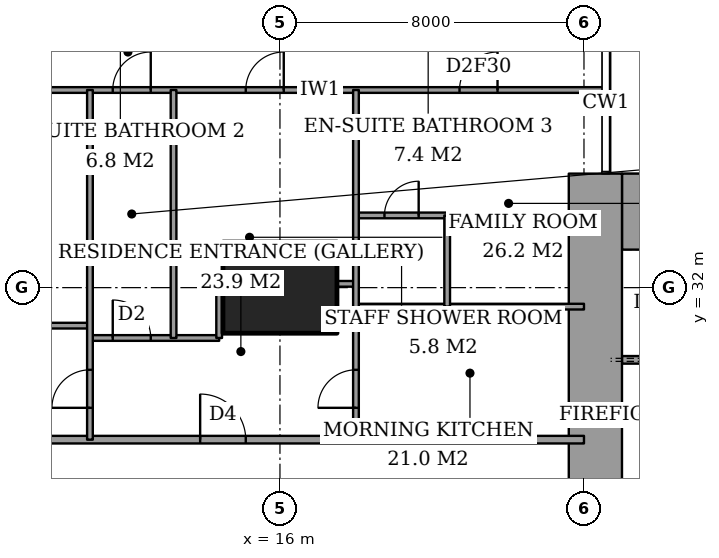
"""IFC4 building model, lengths in metres.
Left out: names, types, materials, properties, quantities, classifications, styles, units other than length and angle.
Written with IfcOpenShell. Run it as: python <this file> out.ifc"""

import sys

from ifc_helpers import new_model, si_unit, direction, frame, frame_2d, origin, origin_2d, place, context, subcontext, project, spatial, rectangle, extrude, element, fill, save


model = new_model("IFC4")
c1 = context("Model", 3, precision=1e-05, world=origin(), true_north=direction((0.0, 1.0)))
c2 = subcontext(c1, "Body", "Model", "MODEL_VIEW")
j1 = project(units=[si_unit("LENGTHUNIT", "METRE"), si_unit("PLANEANGLEUNIT", "RADIAN")], contexts=[c1])
p1 = place(None, origin())
s1 = spatial("IfcSite", under=j1, at=p1, CompositionType="ELEMENT")
p2 = place(p1, origin())
s2 = spatial("IfcBuilding", under=s1, at=p2, CompositionType="ELEMENT")
p3 = place(p2, frame((0.0, 0.0, 114.2)))
s3 = spatial("IfcBuildingStorey", under=s2, at=p3, CompositionType="ELEMENT", Elevation=114.2)
p4 = place(p3, frame((16.0, 32.0, 0.0), z_axis=(0.0, 0.0, 1.0), x_axis=(1.0, 0.0, 0.0)))
e1 = element("IfcColumn", 1, at=p4, inside=s3, PredefinedType="COLUMN", context=c2, shape_type="SweptSolid", body=[
    extrude(rectangle(XDim=3.0, YDim=2.4, at=origin_2d()), origin(), (0.0, 0.0, 1.0), 3.6),
])
p5 = place(p3, frame((25.0, 34.0, 0.0), z_axis=(0.0, 0.0, 1.0), x_axis=(1.0, 0.0, 0.0)))
e2 = element("IfcWall", 2, at=p5, inside=s3, PredefinedType="SHEAR", context=c2, shape_type="SweptSolid", body=[
    extrude(rectangle(XDim=3.15, YDim=2.0, at=frame_2d((1.575, 0.0))), origin(), (0.0, 0.0, 1.0), 3.6),
])
p6 = place(p3, frame((24.3, 23.15, 0.0), z_axis=(0.0, 0.0, 1.0), x_axis=(0.0, 1.0, 0.0)))
e3 = element("IfcWall", 3, at=p6, inside=s3, PredefinedType="SHEAR", context=c2, shape_type="SweptSolid", body=[
    extrude(rectangle(XDim=11.85, YDim=1.4, at=frame_2d((5.925, 0.0))), origin(), (0.0, 0.0, 1.0), 3.6),
])
p7 = place(p6, frame((0.75, 0.0, 0.0)))
e4 = element("IfcOpeningElement", 4, at=p7, cuts=e3, PredefinedType="OPENING", context=c2, shape_type="SweptSolid", body=[
    extrude(rectangle(XDim=1.8, YDim=2.4, at=frame_2d((0.9, 1.2))), frame((0.0, 0.71, 0.0), z_axis=(0.0, -1.0, 0.0), x_axis=(1.0, 0.0, 0.0)), (0.0, 0.0, 1.0), 1.42),
])
p8 = place(p3, frame((6.725, 28.0, 0.0), z_axis=(0.0, 0.0, 1.0), x_axis=(1.0, 0.0, 0.0)))
e5 = element("IfcWall", 5, at=p8, inside=s3, PredefinedType="PARTITIONING", context=c2, shape_type="SweptSolid", body=[
    extrude(rectangle(XDim=17.275, YDim=0.2, at=frame_2d((8.637, 0.0))), origin(), (0.0, 0.0, 1.0), 3.35),
])
p9 = place(p8, frame((7.175, 0.0, 0.0)))
e6 = element("IfcOpeningElement", 6, at=p9, cuts=e5, PredefinedType="OPENING", context=c2, shape_type="SweptSolid", body=[
    extrude(rectangle(XDim=1.2, YDim=2.4, at=frame_2d((0.6, 1.2))), frame((0.0, 0.11, 0.0), z_axis=(0.0, -1.0, 0.0), x_axis=(1.0, 0.0, 0.0)), (0.0, 0.0, 1.0), 0.22),
])
p10 = place(p3, frame((11.0, 30.675, 0.0), z_axis=(0.0, 0.0, 1.0), x_axis=(1.0, 0.0, 0.0)))
e7 = element("IfcWall", 7, at=p10, inside=s3, PredefinedType="PARTITIONING", context=c2, shape_type="SweptSolid", body=[
    extrude(rectangle(XDim=3.4, YDim=0.15, at=frame_2d((1.7, 0.0))), origin(), (0.0, 0.0, 1.0), 3.35),
])
p11 = place(p10, frame((0.6, 0.0, 0.0)))
e8 = element("IfcOpeningElement", 8, at=p11, cuts=e7, PredefinedType="OPENING", context=c2, shape_type="SweptSolid", body=[
    extrude(rectangle(XDim=1.0, YDim=2.1, at=frame_2d((0.5, 1.05))), frame((0.0, 0.085, 0.0), z_axis=(0.0, -1.0, 0.0), x_axis=(1.0, 0.0, 0.0)), (0.0, 0.0, 1.0), 0.17),
])
p12 = place(p3, frame((9.5, 31.0, 0.0), z_axis=(0.0, 0.0, 1.0), x_axis=(1.0, 0.0, 0.0)))
e9 = element("IfcWall", 9, at=p12, inside=s3, PredefinedType="PARTITIONING", context=c2, shape_type="SweptSolid", body=[
    extrude(rectangle(XDim=1.5, YDim=0.15, at=frame_2d((0.75, 0.0))), origin(), (0.0, 0.0, 1.0), 3.35),
])
p13 = place(p3, frame((18.0, 31.5, 0.0), z_axis=(0.0, 0.0, 1.0), x_axis=(1.0, 0.0, 0.0)))
e10 = element("IfcWall", 10, at=p13, inside=s3, PredefinedType="PARTITIONING", context=c2, shape_type="SweptSolid", body=[
    extrude(rectangle(XDim=6.0, YDim=0.15, at=frame_2d((3.0, 0.0))), origin(), (0.0, 0.0, 1.0), 3.35),
])
p14 = place(p3, frame((17.5, 32.1, 0.0), z_axis=(0.0, 0.0, 1.0), x_axis=(1.0, 0.0, 0.0)))
e11 = element("IfcWall", 11, at=p14, inside=s3, PredefinedType="PARTITIONING", context=c2, shape_type="SweptSolid", body=[
    extrude(rectangle(XDim=0.5, YDim=0.15, at=frame_2d((0.25, 0.0))), origin(), (0.0, 0.0, 1.0), 2.634),
])
p15 = place(p3, frame((18.0, 33.9, 0.0), z_axis=(0.0, 0.0, 1.0), x_axis=(1.0, 0.0, 0.0)))
e12 = element("IfcWall", 12, at=p15, inside=s3, PredefinedType="PARTITIONING", context=c2, shape_type="SweptSolid", body=[
    extrude(rectangle(XDim=2.4, YDim=0.15, at=frame_2d((1.2, 0.0))), origin(), (0.0, 0.0, 1.0), 3.35),
])
p16 = place(p15, frame((0.75, 0.0, 0.0)))
e13 = element("IfcOpeningElement", 13, at=p16, cuts=e12, PredefinedType="OPENING", context=c2, shape_type="SweptSolid", body=[
    extrude(rectangle(XDim=0.9, YDim=2.1, at=frame_2d((0.45, 1.05))), frame((0.0, 0.085, 0.0), z_axis=(0.0, -1.0, 0.0), x_axis=(1.0, 0.0, 0.0)), (0.0, 0.0, 1.0), 0.17),
])
p17 = place(p3, frame((-0.45, 37.2, 0.0), z_axis=(0.0, 0.0, 1.0), x_axis=(1.0, 0.0, 0.0)))
e14 = element("IfcWall", 14, at=p17, inside=s3, PredefinedType="PARTITIONING", context=c2, shape_type="SweptSolid", body=[
    extrude(rectangle(XDim=25.011, YDim=0.15, at=frame_2d((12.505, 0.0))), origin(), (0.0, 0.0, 1.0), 3.35),
])
p18 = place(p17, frame((12.05, 0.0, 0.0)))
e15 = element("IfcOpeningElement", 15, at=p18, cuts=e14, PredefinedType="OPENING", context=c2, shape_type="SweptSolid", body=[
    extrude(rectangle(XDim=1.0, YDim=2.1, at=frame_2d((0.5, 1.05))), frame((0.0, 0.085, 0.0), z_axis=(0.0, -1.0, 0.0), x_axis=(1.0, 0.0, 0.0)), (0.0, 0.0, 1.0), 0.17),
])
p19 = place(p17, frame((3.087, 0.0, 0.0)))
e16 = element("IfcOpeningElement", 16, at=p19, cuts=e14, PredefinedType="OPENING", context=c2, shape_type="SweptSolid", body=[
    extrude(rectangle(XDim=1.0, YDim=2.1, at=frame_2d((0.5, 1.05))), frame((0.0, 0.085, 0.0), z_axis=(0.0, -1.0, 0.0), x_axis=(1.0, 0.0, 0.0)), (0.0, 0.0, 1.0), 0.17),
])
p20 = place(p17, frame((8.863, 0.0, 0.0)))
e17 = element("IfcOpeningElement", 17, at=p20, cuts=e14, PredefinedType="OPENING", context=c2, shape_type="SweptSolid", body=[
    extrude(rectangle(XDim=0.9, YDim=2.1, at=frame_2d((0.45, 1.05))), frame((0.0, 0.085, 0.0), z_axis=(0.0, -1.0, 0.0), x_axis=(1.0, 0.0, 0.0)), (0.0, 0.0, 1.0), 0.17),
])
p21 = place(p17, frame((15.55, 0.0, 0.0)))
e18 = element("IfcOpeningElement", 18, at=p21, cuts=e14, PredefinedType="OPENING", context=c2, shape_type="SweptSolid", body=[
    extrude(rectangle(XDim=1.0, YDim=2.1, at=frame_2d((0.5, 1.05))), frame((0.0, 0.085, 0.0), z_axis=(0.0, -1.0, 0.0), x_axis=(1.0, 0.0, 0.0)), (0.0, 0.0, 1.0), 0.17),
])
p22 = place(p17, frame((21.175, 0.0, 0.0)))
e19 = element("IfcOpeningElement", 19, at=p22, cuts=e14, PredefinedType="OPENING", context=c2, shape_type="SweptSolid", body=[
    extrude(rectangle(XDim=1.0, YDim=2.1, at=frame_2d((0.5, 1.05))), frame((0.0, 0.085, 0.0), z_axis=(0.0, -1.0, 0.0), x_axis=(1.0, 0.0, 0.0)), (0.0, 0.0, 1.0), 0.17),
])
p23 = place(p3, frame((11.0, 28.0, 0.0), z_axis=(0.0, 0.0, 1.0), x_axis=(0.0, 1.0, 0.0)))
e20 = element("IfcWall", 20, at=p23, inside=s3, PredefinedType="PARTITIONING", context=c2, shape_type="SweptSolid", body=[
    extrude(rectangle(XDim=9.2, YDim=0.15, at=frame_2d((4.6, 0.0))), origin(), (0.0, 0.0, 1.0), 3.35),
])
p24 = place(p23, frame((0.837, 0.0, 0.0)))
e21 = element("IfcOpeningElement", 21, at=p24, cuts=e20, PredefinedType="OPENING", context=c2, shape_type="SweptSolid", body=[
    extrude(rectangle(XDim=1.0, YDim=2.1, at=frame_2d((0.5, 1.05))), frame((0.0, 0.085, 0.0), z_axis=(0.0, -1.0, 0.0), x_axis=(1.0, 0.0, 0.0)), (0.0, 0.0, 1.0), 0.17),
])
p25 = place(p3, frame((13.2, 30.675, 0.0), z_axis=(0.0, 0.0, 1.0), x_axis=(0.0, 1.0, 0.0)))
e22 = element("IfcWall", 22, at=p25, inside=s3, PredefinedType="PARTITIONING", context=c2, shape_type="SweptSolid", body=[
    extrude(rectangle(XDim=6.525, YDim=0.15, at=frame_2d((3.262, 0.0))), origin(), (0.0, 0.0, 1.0), 3.35),
])
p26 = place(p3, frame((14.4, 30.675, 0.0), z_axis=(0.0, 0.0, 1.0), x_axis=(0.0, 1.0, 0.0)))
e23 = element("IfcWall", 23, at=p26, inside=s3, PredefinedType="PARTITIONING", context=c2, shape_type="SweptSolid", body=[
    extrude(rectangle(XDim=1.425, YDim=0.15, at=frame_2d((0.712, 0.0))), origin(), (0.0, 0.0, 1.0), 3.35),
])
p27 = place(p3, frame((18.0, 28.0, 0.0), z_axis=(0.0, 0.0, 1.0), x_axis=(0.0, 1.0, 0.0)))
e24 = element("IfcWall", 24, at=p27, inside=s3, PredefinedType="PARTITIONING", context=c2, shape_type="SweptSolid", body=[
    extrude(rectangle(XDim=9.2, YDim=0.15, at=frame_2d((4.6, 0.0))), origin(), (0.0, 0.0, 1.0), 3.35),
])
p28 = place(p27, frame((0.837, 0.0, 0.0)))
e25 = element("IfcOpeningElement", 25, at=p28, cuts=e24, PredefinedType="OPENING", context=c2, shape_type="SweptSolid", body=[
    extrude(rectangle(XDim=1.0, YDim=2.1, at=frame_2d((0.5, 1.05))), frame((0.0, 0.085, 0.0), z_axis=(0.0, -1.0, 0.0), x_axis=(1.0, 0.0, 0.0)), (0.0, 0.0, 1.0), 0.17),
])
p29 = place(p3, frame((20.4, 31.5, 0.0), z_axis=(0.0, 0.0, 1.0), x_axis=(0.0, 1.0, 0.0)))
e26 = element("IfcWall", 26, at=p29, inside=s3, PredefinedType="PARTITIONING", context=c2, shape_type="SweptSolid", body=[
    extrude(rectangle(XDim=2.4, YDim=0.15, at=frame_2d((1.2, 0.0))), origin(), (0.0, 0.0, 1.0), 3.35),
])
p30 = place(p3, frame((25.0, 30.1, 0.0), z_axis=(0.0, 0.0, 1.0), x_axis=(1.0, 0.0, 0.0)))
e27 = element("IfcWall", 27, at=p30, inside=s3, PredefinedType="PARTITIONING", context=c2, shape_type="SweptSolid", body=[
    extrude(rectangle(XDim=12.7, YDim=0.2, at=frame_2d((6.35, 0.0))), origin(), (0.0, 0.0, 1.0), 3.6),
])
p31 = place(p30, frame((0.9, 0.0, 0.0)))
e28 = element("IfcOpeningElement", 28, at=p31, cuts=e27, PredefinedType="OPENING", context=c2, shape_type="SweptSolid", body=[
    extrude(rectangle(XDim=1.2, YDim=2.1, at=frame_2d((0.6, 1.05))), frame((0.0, 0.11, 0.0), z_axis=(0.0, -1.0, 0.0), x_axis=(1.0, 0.0, 0.0)), (0.0, 0.0, 1.0), 0.22),
])
p32 = place(p18, origin())
e29 = element("IfcDoor", 29, at=p32, inside=s3, OperationType="SINGLE_SWING_LEFT", PredefinedType="DOOR", context=c2, shape_type="SweptSolid", body=[
    extrude(rectangle(XDim=1.0, YDim=2.1, at=frame_2d((0.5, 1.05))), frame((0.0, 0.025, 0.0), z_axis=(0.0, -1.0, 0.0), x_axis=(1.0, 0.0, 0.0)), (0.0, 0.0, 1.0), 0.05),
])
fill(e15, e29)
p33 = place(p24, origin())
e30 = element("IfcDoor", 30, at=p33, inside=s3, OperationType="SINGLE_SWING_RIGHT", PredefinedType="DOOR", context=c2, shape_type="SweptSolid", body=[
    extrude(rectangle(XDim=1.0, YDim=2.1, at=frame_2d((0.5, 1.05))), frame((0.0, 0.025, 0.0), z_axis=(0.0, -1.0, 0.0), x_axis=(1.0, 0.0, 0.0)), (0.0, 0.0, 1.0), 0.05),
])
fill(e21, e30)
p34 = place(p9, origin())
e31 = element("IfcDoor", 31, at=p34, inside=s3, OperationType="SINGLE_SWING_RIGHT", PredefinedType="DOOR", context=c2, shape_type="SweptSolid", body=[
    extrude(rectangle(XDim=1.2, YDim=2.4, at=frame_2d((0.6, 1.2))), frame((0.0, 0.025, 0.0), z_axis=(0.0, -1.0, 0.0), x_axis=(1.0, 0.0, 0.0)), (0.0, 0.0, 1.0), 0.05),
])
fill(e6, e31)
p35 = place(p11, origin())
e32 = element("IfcDoor", 32, at=p35, inside=s3, OperationType="SINGLE_SWING_RIGHT", PredefinedType="DOOR", context=c2, shape_type="SweptSolid", body=[
    extrude(rectangle(XDim=1.0, YDim=2.1, at=frame_2d((0.5, 1.05))), frame((0.0, 0.025, 0.0), z_axis=(0.0, -1.0, 0.0), x_axis=(1.0, 0.0, 0.0)), (0.0, 0.0, 1.0), 0.05),
])
fill(e8, e32)
p36 = place(p21, origin())
e33 = element("IfcDoor", 33, at=p36, inside=s3, OperationType="SINGLE_SWING_LEFT", PredefinedType="DOOR", context=c2, shape_type="SweptSolid", body=[
    extrude(rectangle(XDim=1.0, YDim=2.1, at=frame_2d((0.5, 1.05))), frame((0.0, 0.025, 0.0), z_axis=(0.0, -1.0, 0.0), x_axis=(1.0, 0.0, 0.0)), (0.0, 0.0, 1.0), 0.05),
])
fill(e18, e33)
p37 = place(p16, origin())
e34 = element("IfcDoor", 34, at=p37, inside=s3, OperationType="SINGLE_SWING_LEFT", PredefinedType="DOOR", context=c2, shape_type="SweptSolid", body=[
    extrude(rectangle(XDim=0.9, YDim=2.1, at=frame_2d((0.45, 1.05))), frame((0.0, 0.025, 0.0), z_axis=(0.0, -1.0, 0.0), x_axis=(1.0, 0.0, 0.0)), (0.0, 0.0, 1.0), 0.05),
])
fill(e13, e34)
p38 = place(p22, origin())
e35 = element("IfcDoor", 35, at=p38, inside=s3, OperationType="SINGLE_SWING_LEFT", PredefinedType="DOOR", context=c2, shape_type="SweptSolid", body=[
    extrude(rectangle(XDim=1.0, YDim=2.1, at=frame_2d((0.5, 1.05))), frame((0.0, 0.025, 0.0), z_axis=(0.0, -1.0, 0.0), x_axis=(1.0, 0.0, 0.0)), (0.0, 0.0, 1.0), 0.05),
])
fill(e19, e35)
p39 = place(p28, origin())
e36 = element("IfcDoor", 36, at=p39, inside=s3, OperationType="SINGLE_SWING_RIGHT", PredefinedType="DOOR", context=c2, shape_type="SweptSolid", body=[
    extrude(rectangle(XDim=1.0, YDim=2.1, at=frame_2d((0.5, 1.05))), frame((0.0, 0.025, 0.0), z_axis=(0.0, -1.0, 0.0), x_axis=(1.0, 0.0, 0.0)), (0.0, 0.0, 1.0), 0.05),
])
fill(e25, e36)
save(model, sys.argv[1])
